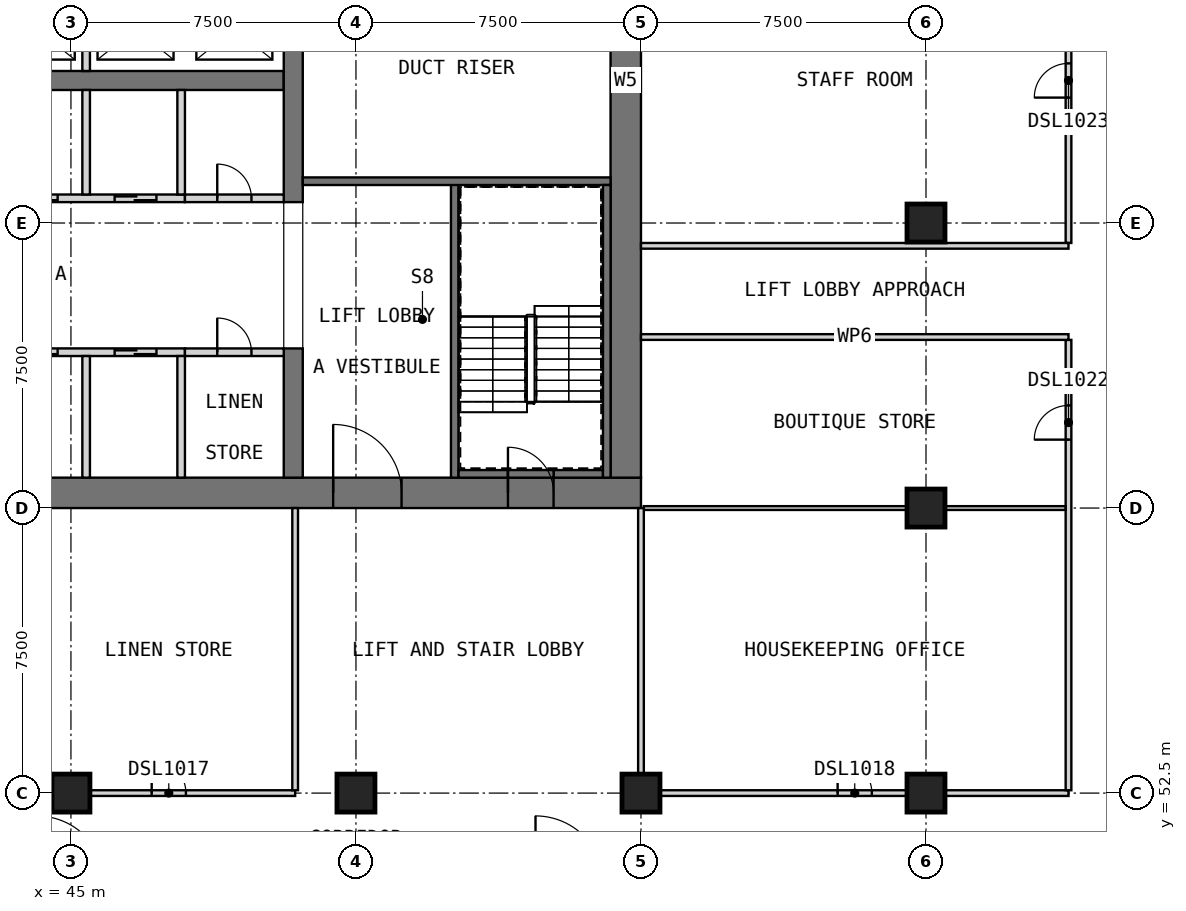
"""IFC4 building model, lengths in metres.
Left out: names, types, materials, properties, quantities, classifications, styles, units other than length and angle.
Written with IfcOpenShell. Run it as: python <this file> out.ifc"""

import sys

from ifc_helpers import new_model, si_unit, direction, frame, frame_2d, origin, origin_2d, place, context, subcontext, project, spatial, rectangle, extrude, element, fill, save


model = new_model("IFC4")
c1 = context("Model", 3, precision=1e-05, world=origin(), true_north=direction((0.0, 1.0)))
c2 = subcontext(c1, "Body", "Model", "MODEL_VIEW")
j1 = project(units=[si_unit("LENGTHUNIT", "METRE"), si_unit("PLANEANGLEUNIT", "RADIAN")], contexts=[c1])
p1 = place(None, origin())
s1 = spatial("IfcSite", under=j1, at=p1, CompositionType="ELEMENT")
p2 = place(p1, origin())
s2 = spatial("IfcBuilding", under=s1, at=p2, CompositionType="ELEMENT")
p3 = place(p2, frame((0.0, 0.0, 124.2)))
s3 = spatial("IfcBuildingStorey", under=s2, at=p3, CompositionType="ELEMENT", Elevation=124.2)
for number, where, z_axis, x_axis in (
    (1, (45.0, 52.5, 0.0), (0.0, 0.0, 1.0), (1.0, 0.0, 0.0)),
    (2, (52.5, 52.5, 0.0), (0.0, 0.0, 1.0), (1.0, 0.0, 0.0)),
    (3, (60.0, 52.5, 0.0), (0.0, 0.0, 1.0), (1.0, 0.0, 0.0)),
    (4, (67.5, 52.5, 0.0), (0.0, 0.0, 1.0), (1.0, 0.0, 0.0)),
    (5, (67.5, 60.0, 0.0), (0.0, 0.0, 1.0), (1.0, 0.0, 0.0)),
    (6, (67.5, 67.5, 0.0), (0.0, 0.0, 1.0), (1.0, 0.0, 0.0)),
):
    element("IfcColumn", number, at=place(p3, frame(where, z_axis=z_axis, x_axis=x_axis)), inside=s3, PredefinedType="COLUMN", context=c2, shape_type="SweptSolid", body=[
        extrude(rectangle(XDim=1.0, YDim=1.0, at=origin_2d()), origin(), (0.0, 0.0, 1.0), 6.0),
    ])
p4 = place(p3, frame((30.0, 60.4, 0.0), z_axis=(0.0, 0.0, 1.0), x_axis=(1.0, 0.0, 0.0)))
e7 = element("IfcWall", 7, at=p4, inside=s3, PredefinedType="SHEAR", context=c2, shape_type="SweptSolid", body=[
    extrude(rectangle(XDim=30.0, YDim=0.8, at=frame_2d((15.0, 0.0))), origin(), (0.0, 0.0, 1.0), 6.0),
])
p5 = place(p4, frame((21.9, 0.0, 0.0)))
e8 = element("IfcOpeningElement", 8, at=p5, cuts=e7, PredefinedType="OPENING", context=c2, shape_type="SweptSolid", body=[
    extrude(rectangle(XDim=1.8, YDim=2.1, at=frame_2d((0.9, 1.05))), frame((0.0, 0.41, 0.0), z_axis=(0.0, -1.0, 0.0), x_axis=(1.0, 0.0, 0.0)), (0.0, 0.0, 1.0), 0.82),
])
p6 = place(p4, frame((26.5, 0.0, 0.0)))
e9 = element("IfcOpeningElement", 9, at=p6, cuts=e7, PredefinedType="OPENING", context=c2, shape_type="SweptSolid", body=[
    extrude(rectangle(XDim=1.2, YDim=2.1, at=frame_2d((0.6, 1.05))), frame((0.0, 0.41, 0.0), z_axis=(0.0, -1.0, 0.0), x_axis=(1.0, 0.0, 0.0)), (0.0, 0.0, 1.0), 0.82),
])
p7 = place(p3, frame((59.6, 60.8, 0.0), z_axis=(0.0, 0.0, 1.0), x_axis=(0.0, 1.0, 0.0)))
e10 = element("IfcWall", 10, at=p7, inside=s3, PredefinedType="SHEAR", context=c2, shape_type="SweptSolid", body=[
    extrude(rectangle(XDim=20.9, YDim=0.8, at=frame_2d((10.45, 0.0))), origin(), (0.0, 0.0, 1.0), 6.0),
])
p8 = place(p7, frame((14.7, 0.0, 0.0)))
e11 = element("IfcOpeningElement", 11, at=p8, cuts=e10, PredefinedType="OPENING", context=c2, shape_type="SweptSolid", body=[
    extrude(rectangle(XDim=1.8, YDim=2.1, at=frame_2d((0.9, 1.05))), frame((0.0, 0.41, 0.0), z_axis=(0.0, -1.0, 0.0), x_axis=(1.0, 0.0, 0.0)), (0.0, 0.0, 1.0), 0.82),
])
p9 = place(p3, frame((35.0, 71.25, 0.0), z_axis=(0.0, 0.0, 1.0), x_axis=(1.0, 0.0, 0.0)))
e12 = element("IfcWall", 12, at=p9, inside=s3, PredefinedType="SHEAR", context=c2, shape_type="SweptSolid", body=[
    extrude(rectangle(XDim=15.6, YDim=0.5, at=frame_2d((7.8, 0.0))), origin(), (0.0, 0.0, 1.0), 6.0),
])
p10 = place(p3, frame((50.85, 60.8, 0.0), z_axis=(0.0, 0.0, 1.0), x_axis=(0.0, 1.0, 0.0)))
e13 = element("IfcWall", 13, at=p10, inside=s3, PredefinedType="SHEAR", context=c2, shape_type="SweptSolid", body=[
    extrude(rectangle(XDim=3.4, YDim=0.5, at=frame_2d((1.7, 0.0))), origin(), (0.0, 0.0, 1.0), 6.0),
])
p11 = place(p3, frame((50.85, 68.05, 0.0), z_axis=(0.0, 0.0, 1.0), x_axis=(0.0, 1.0, 0.0)))
e14 = element("IfcWall", 14, at=p11, inside=s3, PredefinedType="SHEAR", context=c2, shape_type="SweptSolid", body=[
    extrude(rectangle(XDim=6.4, YDim=0.5, at=frame_2d((3.2, 0.0))), origin(), (0.0, 0.0, 1.0), 6.0),
])
p12 = place(p3, frame((35.0, 64.1, 0.0), z_axis=(0.0, 0.0, 1.0), x_axis=(1.0, 0.0, 0.0)))
e15 = element("IfcWall", 15, at=p12, inside=s3, PredefinedType="SOLIDWALL", context=c2, shape_type="SweptSolid", body=[
    extrude(rectangle(XDim=13.0, YDim=0.2, at=frame_2d((6.5, 0.0))), origin(), (0.0, 0.0, 1.0), 6.0),
])
p13 = place(p12, frame((0.75, 0.0, 0.0)))
e16 = element("IfcOpeningElement", 16, at=p13, cuts=e15, PredefinedType="OPENING", context=c2, shape_type="SweptSolid", body=[
    extrude(rectangle(XDim=1.1, YDim=2.1, at=frame_2d((0.55, 1.05))), frame((0.0, 0.11, 0.0), z_axis=(0.0, -1.0, 0.0), x_axis=(1.0, 0.0, 0.0)), (0.0, 0.0, 1.0), 0.22),
])
p14 = place(p12, frame((3.35, 0.0, 0.0)))
e17 = element("IfcOpeningElement", 17, at=p14, cuts=e15, PredefinedType="OPENING", context=c2, shape_type="SweptSolid", body=[
    extrude(rectangle(XDim=1.1, YDim=2.1, at=frame_2d((0.55, 1.05))), frame((0.0, 0.11, 0.0), z_axis=(0.0, -1.0, 0.0), x_axis=(1.0, 0.0, 0.0)), (0.0, 0.0, 1.0), 0.22),
])
p15 = place(p12, frame((5.95, 0.0, 0.0)))
e18 = element("IfcOpeningElement", 18, at=p15, cuts=e15, PredefinedType="OPENING", context=c2, shape_type="SweptSolid", body=[
    extrude(rectangle(XDim=1.1, YDim=2.1, at=frame_2d((0.55, 1.05))), frame((0.0, 0.11, 0.0), z_axis=(0.0, -1.0, 0.0), x_axis=(1.0, 0.0, 0.0)), (0.0, 0.0, 1.0), 0.22),
])
p16 = place(p12, frame((8.55, 0.0, 0.0)))
e19 = element("IfcOpeningElement", 19, at=p16, cuts=e15, PredefinedType="OPENING", context=c2, shape_type="SweptSolid", body=[
    extrude(rectangle(XDim=1.1, YDim=2.1, at=frame_2d((0.55, 1.05))), frame((0.0, 0.11, 0.0), z_axis=(0.0, -1.0, 0.0), x_axis=(1.0, 0.0, 0.0)), (0.0, 0.0, 1.0), 0.22),
])
p17 = place(p12, frame((11.15, 0.0, 0.0)))
e20 = element("IfcOpeningElement", 20, at=p17, cuts=e15, PredefinedType="OPENING", context=c2, shape_type="SweptSolid", body=[
    extrude(rectangle(XDim=1.1, YDim=2.1, at=frame_2d((0.55, 1.05))), frame((0.0, 0.11, 0.0), z_axis=(0.0, -1.0, 0.0), x_axis=(1.0, 0.0, 0.0)), (0.0, 0.0, 1.0), 0.22),
])
for number, where, z_axis, x_axis in (
    (21, (45.4, 60.8, 0.0), (0.0, 0.0, 1.0), (0.0, 1.0, 0.0)),
    (22, (47.9, 60.8, 0.0), (0.0, 0.0, 1.0), (0.0, 1.0, 0.0)),
):
    element("IfcWall", number, at=place(p3, frame(where, z_axis=z_axis, x_axis=x_axis)), inside=s3, PredefinedType="SOLIDWALL", context=c2, shape_type="SweptSolid", body=[
        extrude(rectangle(XDim=3.2, YDim=0.2, at=frame_2d((1.6, 0.0))), origin(), (0.0, 0.0, 1.0), 6.0),
    ])
p18 = place(p3, frame((48.0, 64.1, 0.0), z_axis=(0.0, 0.0, 1.0), x_axis=(1.0, 0.0, 0.0)))
e23 = element("IfcWall", 23, at=p18, inside=s3, PredefinedType="PARTITIONING", context=c2, shape_type="SweptSolid", body=[
    extrude(rectangle(XDim=2.6, YDim=0.2, at=frame_2d((1.3, 0.0))), origin(), (0.0, 0.0, 1.0), 5.75),
])
p19 = place(p18, frame((0.85, 0.0, 0.0)))
e24 = element("IfcOpeningElement", 24, at=p19, cuts=e23, PredefinedType="OPENING", context=c2, shape_type="SweptSolid", body=[
    extrude(rectangle(XDim=0.9, YDim=2.1, at=frame_2d((0.45, 1.05))), frame((0.0, 0.11, 0.0), z_axis=(0.0, -1.0, 0.0), x_axis=(1.0, 0.0, 0.0)), (0.0, 0.0, 1.0), 0.22),
])
p20 = place(p3, frame((35.0, 68.15, 0.0), z_axis=(0.0, 0.0, 1.0), x_axis=(1.0, 0.0, 0.0)))
e25 = element("IfcWall", 25, at=p20, inside=s3, PredefinedType="SOLIDWALL", context=c2, shape_type="SweptSolid", body=[
    extrude(rectangle(XDim=13.0, YDim=0.2, at=frame_2d((6.5, 0.0))), origin(), (0.0, 0.0, 1.0), 6.0),
])
p21 = place(p20, frame((0.75, 0.0, 0.0)))
e26 = element("IfcOpeningElement", 26, at=p21, cuts=e25, PredefinedType="OPENING", context=c2, shape_type="SweptSolid", body=[
    extrude(rectangle(XDim=1.1, YDim=2.1, at=frame_2d((0.55, 1.05))), frame((0.0, 0.11, 0.0), z_axis=(0.0, -1.0, 0.0), x_axis=(1.0, 0.0, 0.0)), (0.0, 0.0, 1.0), 0.22),
])
p22 = place(p20, frame((3.35, 0.0, 0.0)))
e27 = element("IfcOpeningElement", 27, at=p22, cuts=e25, PredefinedType="OPENING", context=c2, shape_type="SweptSolid", body=[
    extrude(rectangle(XDim=1.1, YDim=2.1, at=frame_2d((0.55, 1.05))), frame((0.0, 0.11, 0.0), z_axis=(0.0, -1.0, 0.0), x_axis=(1.0, 0.0, 0.0)), (0.0, 0.0, 1.0), 0.22),
])
p23 = place(p20, frame((5.95, 0.0, 0.0)))
e28 = element("IfcOpeningElement", 28, at=p23, cuts=e25, PredefinedType="OPENING", context=c2, shape_type="SweptSolid", body=[
    extrude(rectangle(XDim=1.1, YDim=2.1, at=frame_2d((0.55, 1.05))), frame((0.0, 0.11, 0.0), z_axis=(0.0, -1.0, 0.0), x_axis=(1.0, 0.0, 0.0)), (0.0, 0.0, 1.0), 0.22),
])
p24 = place(p20, frame((8.55, 0.0, 0.0)))
e29 = element("IfcOpeningElement", 29, at=p24, cuts=e25, PredefinedType="OPENING", context=c2, shape_type="SweptSolid", body=[
    extrude(rectangle(XDim=1.1, YDim=2.1, at=frame_2d((0.55, 1.05))), frame((0.0, 0.11, 0.0), z_axis=(0.0, -1.0, 0.0), x_axis=(1.0, 0.0, 0.0)), (0.0, 0.0, 1.0), 0.22),
])
p25 = place(p20, frame((11.15, 0.0, 0.0)))
e30 = element("IfcOpeningElement", 30, at=p25, cuts=e25, PredefinedType="OPENING", context=c2, shape_type="SweptSolid", body=[
    extrude(rectangle(XDim=1.1, YDim=2.1, at=frame_2d((0.55, 1.05))), frame((0.0, 0.11, 0.0), z_axis=(0.0, -1.0, 0.0), x_axis=(1.0, 0.0, 0.0)), (0.0, 0.0, 1.0), 0.22),
])
for number, where, z_axis, x_axis in (
    (31, (45.4, 68.25, 0.0), (0.0, 0.0, 1.0), (0.0, 1.0, 0.0)),
    (32, (47.9, 68.25, 0.0), (0.0, 0.0, 1.0), (0.0, 1.0, 0.0)),
):
    element("IfcWall", number, at=place(p3, frame(where, z_axis=z_axis, x_axis=x_axis)), inside=s3, PredefinedType="SOLIDWALL", context=c2, shape_type="SweptSolid", body=[
        extrude(rectangle(XDim=2.75, YDim=0.2, at=frame_2d((1.375, 0.0))), origin(), (0.0, 0.0, 1.0), 6.0),
    ])
p26 = place(p3, frame((48.0, 68.15, 0.0), z_axis=(0.0, 0.0, 1.0), x_axis=(1.0, 0.0, 0.0)))
e33 = element("IfcWall", 33, at=p26, inside=s3, PredefinedType="PARTITIONING", context=c2, shape_type="SweptSolid", body=[
    extrude(rectangle(XDim=2.6, YDim=0.2, at=frame_2d((1.3, 0.0))), origin(), (0.0, 0.0, 1.0), 5.75),
])
p27 = place(p26, frame((0.85, 0.0, 0.0)))
e34 = element("IfcOpeningElement", 34, at=p27, cuts=e33, PredefinedType="OPENING", context=c2, shape_type="SweptSolid", body=[
    extrude(rectangle(XDim=0.9, YDim=2.1, at=frame_2d((0.45, 1.05))), frame((0.0, 0.11, 0.0), z_axis=(0.0, -1.0, 0.0), x_axis=(1.0, 0.0, 0.0)), (0.0, 0.0, 1.0), 0.22),
])
p28 = place(p3, frame((45.4, 71.5, 0.0), z_axis=(0.0, 0.0, 1.0), x_axis=(0.0, 1.0, 0.0)))
e35 = element("IfcWall", 35, at=p28, inside=s3, PredefinedType="SOLIDWALL", context=c2, shape_type="SweptSolid", body=[
    extrude(rectangle(XDim=2.0, YDim=0.2, at=frame_2d((1.0, 0.0))), origin(), (0.0, 0.0, 1.0), 6.0),
])
p29 = place(p3, frame((55.1, 60.8, 0.0), z_axis=(0.0, 0.0, 1.0), x_axis=(0.0, 1.0, 0.0)))
e36 = element("IfcWall", 36, at=p29, inside=s3, PredefinedType="SOLIDWALL", context=c2, shape_type="SweptSolid", body=[
    extrude(rectangle(XDim=7.8, YDim=0.2, at=frame_2d((3.9, 0.0))), origin(), (0.0, 0.0, 1.0), 5.75),
])
p30 = place(p3, frame((51.1, 68.6, 0.0), z_axis=(0.0, 0.0, 1.0), x_axis=(1.0, 0.0, 0.0)))
e37 = element("IfcWall", 37, at=p30, inside=s3, PredefinedType="SOLIDWALL", context=c2, shape_type="SweptSolid", body=[
    extrude(rectangle(XDim=8.1, YDim=0.2, at=frame_2d((4.05, 0.0))), origin(), (0.0, 0.0, 1.0), 5.75),
])
for number, where, z_axis, x_axis in (
    (38, (55.2, 60.9, 0.0), (0.0, 0.0, 1.0), (1.0, 0.0, 0.0)),
    (39, (57.7, 60.9, 0.0), (0.0, 0.0, 1.0), (1.0, 0.0, 0.0)),
):
    element("IfcWall", number, at=place(p3, frame(where, z_axis=z_axis, x_axis=x_axis)), inside=s3, PredefinedType="SOLIDWALL", context=c2, shape_type="SweptSolid", body=[
        extrude(rectangle(XDim=1.3, YDim=0.2, at=frame_2d((0.65, 0.0))), origin(), (0.0, 0.0, 1.0), 5.75),
    ])
p31 = place(p3, frame((59.1, 60.8, 0.0), z_axis=(0.0, 0.0, 1.0), x_axis=(0.0, 1.0, 0.0)))
e40 = element("IfcWall", 40, at=p31, inside=s3, PredefinedType="SOLIDWALL", context=c2, shape_type="SweptSolid", body=[
    extrude(rectangle(XDim=7.7, YDim=0.2, at=frame_2d((3.85, 0.0))), origin(), (0.0, 0.0, 1.0), 5.75),
])
p32 = place(p3, frame((56.5, 60.9, 3.2), z_axis=(0.0, 0.0, 1.0), x_axis=(1.0, 0.0, 0.0)))
e41 = element("IfcWall", 41, at=p32, inside=s3, PredefinedType="SOLIDWALL", context=c2, shape_type="SweptSolid", body=[
    extrude(rectangle(XDim=1.2, YDim=0.2, at=frame_2d((0.6, 0.0))), origin(), (0.0, 0.0, 1.0), 2.55),
])
p33 = place(p3, frame((30.0, 52.5, 0.0), z_axis=(0.0, 0.0, 1.0), x_axis=(1.0, 0.0, 0.0)))
e42 = element("IfcWall", 42, at=p33, inside=s3, PredefinedType="PARTITIONING", context=c2, shape_type="SweptSolid", body=[
    extrude(rectangle(XDim=20.9, YDim=0.15, at=frame_2d((10.45, 0.0))), origin(), (0.0, 0.0, 1.0), 5.75),
])
p34 = place(p33, frame((5.975, 0.0, 0.0)))
e43 = element("IfcOpeningElement", 43, at=p34, cuts=e42, PredefinedType="OPENING", context=c2, shape_type="SweptSolid", body=[
    extrude(rectangle(XDim=0.9, YDim=2.1, at=frame_2d((0.45, 1.05))), frame((0.0, 0.085, 0.0), z_axis=(0.0, -1.0, 0.0), x_axis=(1.0, 0.0, 0.0)), (0.0, 0.0, 1.0), 0.17),
])
p35 = place(p33, frame((12.075, 0.0, 0.0)))
e44 = element("IfcOpeningElement", 44, at=p35, cuts=e42, PredefinedType="OPENING", context=c2, shape_type="SweptSolid", body=[
    extrude(rectangle(XDim=0.9, YDim=2.1, at=frame_2d((0.45, 1.05))), frame((0.0, 0.085, 0.0), z_axis=(0.0, -1.0, 0.0), x_axis=(1.0, 0.0, 0.0)), (0.0, 0.0, 1.0), 0.17),
])
p36 = place(p33, frame((17.125, 0.0, 0.0)))
e45 = element("IfcOpeningElement", 45, at=p36, cuts=e42, PredefinedType="OPENING", context=c2, shape_type="SweptSolid", body=[
    extrude(rectangle(XDim=0.9, YDim=2.1, at=frame_2d((0.45, 1.05))), frame((0.0, 0.085, 0.0), z_axis=(0.0, -1.0, 0.0), x_axis=(1.0, 0.0, 0.0)), (0.0, 0.0, 1.0), 0.17),
])
p37 = place(p3, frame((60.0, 52.5, 0.0), z_axis=(0.0, 0.0, 1.0), x_axis=(1.0, 0.0, 0.0)))
e46 = element("IfcWall", 46, at=p37, inside=s3, PredefinedType="PARTITIONING", context=c2, shape_type="SweptSolid", body=[
    extrude(rectangle(XDim=11.25, YDim=0.15, at=frame_2d((5.625, 0.0))), origin(), (0.0, 0.0, 1.0), 5.75),
])
p38 = place(p37, frame((5.175, 0.0, 0.0)))
e47 = element("IfcOpeningElement", 47, at=p38, cuts=e46, PredefinedType="OPENING", context=c2, shape_type="SweptSolid", body=[
    extrude(rectangle(XDim=0.9, YDim=2.1, at=frame_2d((0.45, 1.05))), frame((0.0, 0.085, 0.0), z_axis=(0.0, -1.0, 0.0), x_axis=(1.0, 0.0, 0.0)), (0.0, 0.0, 1.0), 0.17),
])
p39 = place(p3, frame((71.25, 52.575, 0.0), z_axis=(0.0, 0.0, 1.0), x_axis=(0.0, 1.0, 0.0)))
e48 = element("IfcWall", 48, at=p39, inside=s3, PredefinedType="PARTITIONING", context=c2, shape_type="SweptSolid", body=[
    extrude(rectangle(XDim=11.85, YDim=0.15, at=frame_2d((5.925, 0.0))), origin(), (0.0, 0.0, 1.0), 5.75),
])
p40 = place(p39, frame((9.225, 0.0, 0.0)))
e49 = element("IfcOpeningElement", 49, at=p40, cuts=e48, PredefinedType="OPENING", context=c2, shape_type="SweptSolid", body=[
    extrude(rectangle(XDim=0.9, YDim=2.1, at=frame_2d((0.45, 1.05))), frame((0.0, 0.085, 0.0), z_axis=(0.0, -1.0, 0.0), x_axis=(1.0, 0.0, 0.0)), (0.0, 0.0, 1.0), 0.17),
])
p41 = place(p3, frame((71.25, 66.975, 0.0), z_axis=(0.0, 0.0, 1.0), x_axis=(0.0, 1.0, 0.0)))
e50 = element("IfcWall", 50, at=p41, inside=s3, PredefinedType="PARTITIONING", context=c2, shape_type="SweptSolid", body=[
    extrude(rectangle(XDim=8.55, YDim=0.15, at=frame_2d((4.275, 0.0))), origin(), (0.0, 0.0, 1.0), 5.75),
])
p42 = place(p41, frame((3.825, 0.0, 0.0)))
e51 = element("IfcOpeningElement", 51, at=p42, cuts=e50, PredefinedType="OPENING", context=c2, shape_type="SweptSolid", body=[
    extrude(rectangle(XDim=0.9, YDim=2.1, at=frame_2d((0.45, 1.05))), frame((0.0, 0.085, 0.0), z_axis=(0.0, -1.0, 0.0), x_axis=(1.0, 0.0, 0.0)), (0.0, 0.0, 1.0), 0.17),
])
p43 = place(p3, frame((60.075, 60.0, 0.0), z_axis=(0.0, 0.0, 1.0), x_axis=(1.0, 0.0, 0.0)))
e52 = element("IfcWall", 52, at=p43, inside=s3, PredefinedType="PARTITIONING", context=c2, shape_type="SweptSolid", body=[
    extrude(rectangle(XDim=11.1, YDim=0.1, at=frame_2d((5.55, 0.0))), origin(), (0.0, 0.0, 1.0), 5.75),
])
for number, where, z_axis, x_axis in (
    (53, (60.0, 64.5, 0.0), (0.0, 0.0, 1.0), (1.0, 0.0, 0.0)),
    (54, (60.0, 66.9, 0.0), (0.0, 0.0, 1.0), (1.0, 0.0, 0.0)),
):
    element("IfcWall", number, at=place(p3, frame(where, z_axis=z_axis, x_axis=x_axis)), inside=s3, PredefinedType="PARTITIONING", context=c2, shape_type="SweptSolid", body=[
        extrude(rectangle(XDim=11.25, YDim=0.15, at=frame_2d((5.625, 0.0))), origin(), (0.0, 0.0, 1.0), 5.75),
    ])
for number, where, z_axis, x_axis in (
    (55, (50.9, 52.575, 0.0), (0.0, 0.0, 1.0), (0.0, 1.0, 0.0)),
    (56, (60.0, 52.575, 0.0), (0.0, 0.0, 1.0), (0.0, 1.0, 0.0)),
):
    element("IfcWall", number, at=place(p3, frame(where, z_axis=z_axis, x_axis=x_axis)), inside=s3, PredefinedType="PARTITIONING", context=c2, shape_type="SweptSolid", body=[
        extrude(rectangle(XDim=7.425, YDim=0.15, at=frame_2d((3.712, 0.0))), origin(), (0.0, 0.0, 1.0), 5.75),
    ])
p44 = place(p16, origin())
e57 = element("IfcDoor", 57, at=p44, inside=s3, OperationType="DOUBLE_DOOR_SLIDING", PredefinedType="DOOR", context=c2, shape_type="SweptSolid", body=[
    extrude(rectangle(XDim=1.1, YDim=2.1, at=frame_2d((0.55, 1.05))), frame((0.0, 0.025, 0.0), z_axis=(0.0, -1.0, 0.0), x_axis=(1.0, 0.0, 0.0)), (0.0, 0.0, 1.0), 0.05),
])
fill(e19, e57)
p45 = place(p17, origin())
e58 = element("IfcDoor", 58, at=p45, inside=s3, OperationType="DOUBLE_DOOR_SLIDING", PredefinedType="DOOR", context=c2, shape_type="SweptSolid", body=[
    extrude(rectangle(XDim=1.1, YDim=2.1, at=frame_2d((0.55, 1.05))), frame((0.0, 0.025, 0.0), z_axis=(0.0, -1.0, 0.0), x_axis=(1.0, 0.0, 0.0)), (0.0, 0.0, 1.0), 0.05),
])
fill(e20, e58)
p46 = place(p19, origin())
e59 = element("IfcDoor", 59, at=p46, inside=s3, OperationType="SINGLE_SWING_RIGHT", PredefinedType="DOOR", context=c2, shape_type="SweptSolid", body=[
    extrude(rectangle(XDim=0.9, YDim=2.1, at=frame_2d((0.45, 1.05))), frame((0.0, 0.025, 0.0), z_axis=(0.0, -1.0, 0.0), x_axis=(1.0, 0.0, 0.0)), (0.0, 0.0, 1.0), 0.05),
])
fill(e24, e59)
p47 = place(p24, origin())
e60 = element("IfcDoor", 60, at=p47, inside=s3, OperationType="DOUBLE_DOOR_SLIDING", PredefinedType="DOOR", context=c2, shape_type="SweptSolid", body=[
    extrude(rectangle(XDim=1.1, YDim=2.1, at=frame_2d((0.55, 1.05))), frame((0.0, 0.025, 0.0), z_axis=(0.0, -1.0, 0.0), x_axis=(1.0, 0.0, 0.0)), (0.0, 0.0, 1.0), 0.05),
])
fill(e29, e60)
p48 = place(p25, origin())
e61 = element("IfcDoor", 61, at=p48, inside=s3, OperationType="DOUBLE_DOOR_SLIDING", PredefinedType="DOOR", context=c2, shape_type="SweptSolid", body=[
    extrude(rectangle(XDim=1.1, YDim=2.1, at=frame_2d((0.55, 1.05))), frame((0.0, 0.025, 0.0), z_axis=(0.0, -1.0, 0.0), x_axis=(1.0, 0.0, 0.0)), (0.0, 0.0, 1.0), 0.05),
])
fill(e30, e61)
p49 = place(p27, origin())
e62 = element("IfcDoor", 62, at=p49, inside=s3, OperationType="SINGLE_SWING_RIGHT", PredefinedType="DOOR", context=c2, shape_type="SweptSolid", body=[
    extrude(rectangle(XDim=0.9, YDim=2.1, at=frame_2d((0.45, 1.05))), frame((0.0, 0.025, 0.0), z_axis=(0.0, -1.0, 0.0), x_axis=(1.0, 0.0, 0.0)), (0.0, 0.0, 1.0), 0.05),
])
fill(e34, e62)
p50 = place(p5, origin())
e63 = element("IfcDoor", 63, at=p50, inside=s3, OperationType="DOUBLE_DOOR_SINGLE_SWING", PredefinedType="DOOR", context=c2, shape_type="SweptSolid", body=[
    extrude(rectangle(XDim=1.8, YDim=2.1, at=frame_2d((0.9, 1.05))), frame((0.0, 0.025, 0.0), z_axis=(0.0, -1.0, 0.0), x_axis=(1.0, 0.0, 0.0)), (0.0, 0.0, 1.0), 0.05),
])
fill(e8, e63)
p51 = place(p6, origin())
e64 = element("IfcDoor", 64, at=p51, inside=s3, OperationType="SINGLE_SWING_LEFT", PredefinedType="DOOR", context=c2, shape_type="SweptSolid", body=[
    extrude(rectangle(XDim=1.2, YDim=2.1, at=frame_2d((0.6, 1.05))), frame((0.0, 0.025, 0.0), z_axis=(0.0, -1.0, 0.0), x_axis=(1.0, 0.0, 0.0)), (0.0, 0.0, 1.0), 0.05),
])
fill(e9, e64)
p52 = place(p36, origin())
e65 = element("IfcDoor", 65, at=p52, inside=s3, OperationType="SINGLE_SWING_LEFT", PredefinedType="DOOR", context=c2, shape_type="SweptSolid", body=[
    extrude(rectangle(XDim=0.9, YDim=2.1, at=frame_2d((0.45, 1.05))), frame((0.0, 0.025, 0.0), z_axis=(0.0, -1.0, 0.0), x_axis=(1.0, 0.0, 0.0)), (0.0, 0.0, 1.0), 0.05),
])
fill(e45, e65)
p53 = place(p38, origin())
e66 = element("IfcDoor", 66, at=p53, inside=s3, OperationType="SINGLE_SWING_LEFT", PredefinedType="DOOR", context=c2, shape_type="SweptSolid", body=[
    extrude(rectangle(XDim=0.9, YDim=2.1, at=frame_2d((0.45, 1.05))), frame((0.0, 0.025, 0.0), z_axis=(0.0, -1.0, 0.0), x_axis=(1.0, 0.0, 0.0)), (0.0, 0.0, 1.0), 0.05),
])
fill(e47, e66)
p54 = place(p40, origin())
e67 = element("IfcDoor", 67, at=p54, inside=s3, OperationType="SINGLE_SWING_LEFT", PredefinedType="DOOR", context=c2, shape_type="SweptSolid", body=[
    extrude(rectangle(XDim=0.9, YDim=2.1, at=frame_2d((0.45, 1.05))), frame((0.0, 0.025, 0.0), z_axis=(0.0, -1.0, 0.0), x_axis=(1.0, 0.0, 0.0)), (0.0, 0.0, 1.0), 0.05),
])
fill(e49, e67)
p55 = place(p42, origin())
e68 = element("IfcDoor", 68, at=p55, inside=s3, OperationType="SINGLE_SWING_LEFT", PredefinedType="DOOR", context=c2, shape_type="SweptSolid", body=[
    extrude(rectangle(XDim=0.9, YDim=2.1, at=frame_2d((0.45, 1.05))), frame((0.0, 0.025, 0.0), z_axis=(0.0, -1.0, 0.0), x_axis=(1.0, 0.0, 0.0)), (0.0, 0.0, 1.0), 0.05),
])
fill(e51, e68)
save(model, sys.argv[1])
